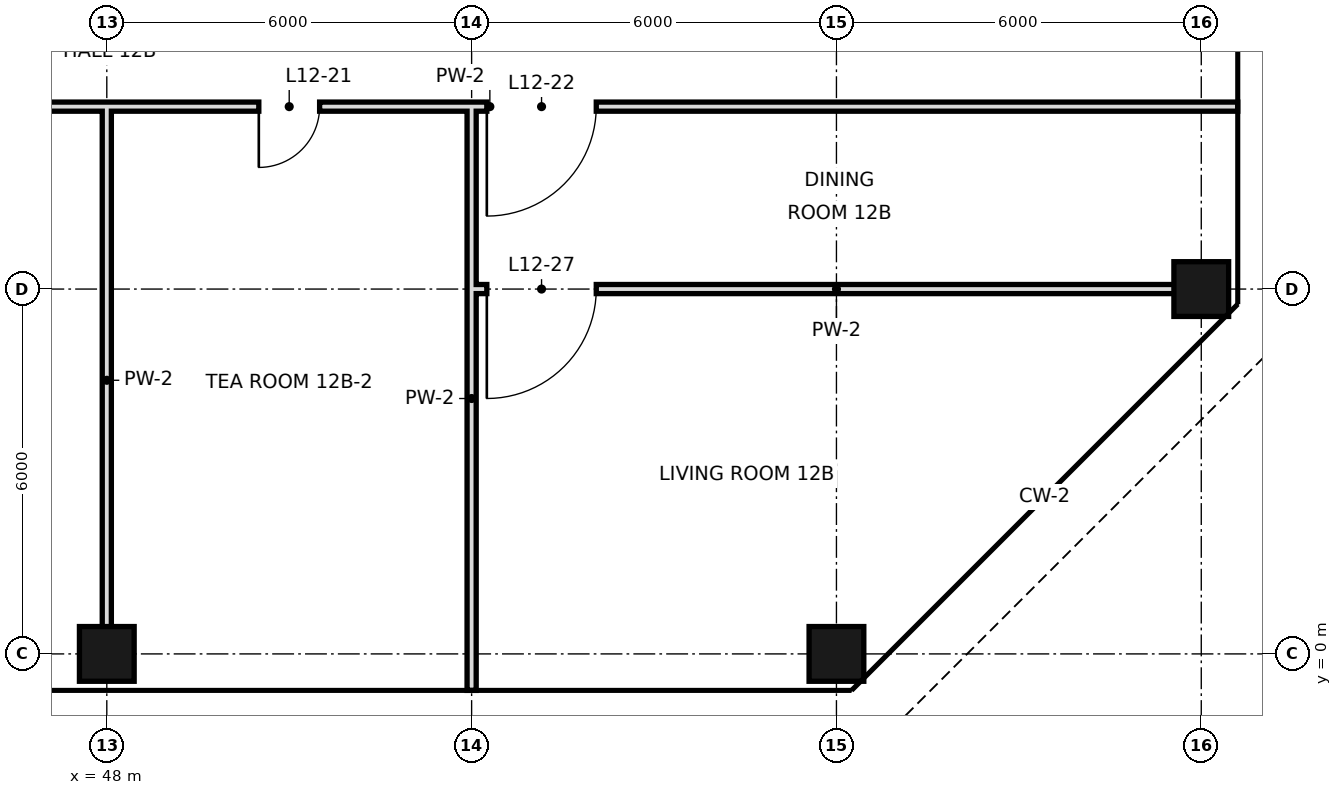
"""IFC4 building model, lengths in metres.
Left out: names, types, materials, properties, quantities, classifications, styles, units other than length and angle.
Written with IfcOpenShell. Run it as: python <this file> out.ifc"""

import sys

from ifc_helpers import new_model, si_unit, direction, frame, frame_2d, origin, origin_2d, place, context, subcontext, project, spatial, rectangle, hollow_rectangle, extrude, element, fill, save


model = new_model("IFC4")
c1 = context("Model", 3, precision=1e-05, world=origin(), true_north=direction((0.0, 1.0)))
c2 = subcontext(c1, "Body", "Model", "MODEL_VIEW")
j1 = project(units=[si_unit("LENGTHUNIT", "METRE"), si_unit("PLANEANGLEUNIT", "RADIAN")], contexts=[c1])
p1 = place(None, origin())
s1 = spatial("IfcSite", under=j1, at=p1, CompositionType="ELEMENT")
p2 = place(p1, origin())
s2 = spatial("IfcBuilding", under=s1, at=p2, CompositionType="ELEMENT")
p3 = place(p2, frame((0.0, 0.0, 64.2)))
s3 = spatial("IfcBuildingStorey", under=s2, at=p3, CompositionType="ELEMENT", Elevation=64.2)
for number, where, z_axis, x_axis in (
    (1, (48.0, 0.0, 0.0), (0.0, 0.0, 1.0), (1.0, 0.0, 0.0)),
    (2, (60.0, 0.0, 0.0), (0.0, 0.0, 1.0), (1.0, 0.0, 0.0)),
    (3, (66.0, 6.0, 0.0), (0.0, 0.0, 1.0), (1.0, 0.0, 0.0)),
):
    element("IfcColumn", number, at=place(p3, frame(where, z_axis=z_axis, x_axis=x_axis)), inside=s3, PredefinedType="COLUMN", context=c2, shape_type="SweptSolid", body=[
        extrude(hollow_rectangle(XDim=0.9, YDim=0.9, WallThickness=0.045, at=origin_2d()), origin(), (0.0, 0.0, 1.0), 3.6),
    ])
p4 = place(p3, frame((48.0, 0.0, 0.0), z_axis=(0.0, 0.0, 1.0), x_axis=(0.0, 1.0, 0.0)))
e4 = element("IfcWall", 4, at=p4, inside=s3, PredefinedType="PARTITIONING", context=c2, shape_type="SweptSolid", body=[
    extrude(rectangle(XDim=9.0, YDim=0.15, at=frame_2d((4.5, 0.0))), origin(), (0.0, 0.0, 1.0), 2.72),
])
p5 = place(p3, frame((54.0, -0.6, 0.0), z_axis=(0.0, 0.0, 1.0), x_axis=(0.0, 1.0, 0.0)))
e5 = element("IfcWall", 5, at=p5, inside=s3, PredefinedType="PARTITIONING", context=c2, shape_type="SweptSolid", body=[
    extrude(rectangle(XDim=9.6, YDim=0.15, at=frame_2d((4.8, 0.0))), origin(), (0.0, 0.0, 1.0), 3.42),
])
p6 = place(p3, frame((54.0, 6.0, 0.0), z_axis=(0.0, 0.0, 1.0), x_axis=(1.0, 0.0, 0.0)))
e6 = element("IfcWall", 6, at=p6, inside=s3, PredefinedType="PARTITIONING", context=c2, shape_type="SweptSolid", body=[
    extrude(rectangle(XDim=12.0, YDim=0.15, at=frame_2d((6.0, 0.0))), origin(), (0.0, 0.0, 1.0), 2.52),
])
p7 = place(p6, frame((0.25, 0.0, 0.0)))
e7 = element("IfcOpeningElement", 7, at=p7, cuts=e6, PredefinedType="OPENING", context=c2, shape_type="SweptSolid", body=[
    extrude(rectangle(XDim=1.8, YDim=2.4, at=frame_2d((0.9, 1.2))), frame((0.0, 0.085, 0.0), z_axis=(0.0, -1.0, 0.0), x_axis=(1.0, 0.0, 0.0)), (0.0, 0.0, 1.0), 0.17),
])
p8 = place(p3, frame((42.0, 9.0, 0.0), z_axis=(0.0, 0.0, 1.0), x_axis=(1.0, 0.0, 0.0)))
e8 = element("IfcWall", 8, at=p8, inside=s3, PredefinedType="PARTITIONING", context=c2, shape_type="SweptSolid", body=[
    extrude(rectangle(XDim=24.6, YDim=0.15, at=frame_2d((12.3, 0.0))), origin(), (0.0, 0.0, 1.0), 3.42),
])
p9 = place(p8, frame((1.6, 0.0, 0.0)))
e9 = element("IfcOpeningElement", 9, at=p9, cuts=e8, PredefinedType="OPENING", context=c2, shape_type="SweptSolid", body=[
    extrude(rectangle(XDim=1.0, YDim=2.4, at=frame_2d((0.5, 1.2))), frame((0.0, 0.085, 0.0), z_axis=(0.0, -1.0, 0.0), x_axis=(1.0, 0.0, 0.0)), (0.0, 0.0, 1.0), 0.17),
])
p10 = place(p8, frame((8.5, 0.0, 0.0)))
e10 = element("IfcOpeningElement", 10, at=p10, cuts=e8, PredefinedType="OPENING", context=c2, shape_type="SweptSolid", body=[
    extrude(rectangle(XDim=1.0, YDim=2.4, at=frame_2d((0.5, 1.2))), frame((0.0, 0.085, 0.0), z_axis=(0.0, -1.0, 0.0), x_axis=(1.0, 0.0, 0.0)), (0.0, 0.0, 1.0), 0.17),
])
p11 = place(p8, frame((12.25, 0.0, 0.0)))
e11 = element("IfcOpeningElement", 11, at=p11, cuts=e8, PredefinedType="OPENING", context=c2, shape_type="SweptSolid", body=[
    extrude(rectangle(XDim=1.8, YDim=2.4, at=frame_2d((0.9, 1.2))), frame((0.0, 0.085, 0.0), z_axis=(0.0, -1.0, 0.0), x_axis=(1.0, 0.0, 0.0)), (0.0, 0.0, 1.0), 0.17),
])
p12 = place(p10, frame((1.0, 0.0, 0.0), z_axis=(0.0, 0.0, 1.0), x_axis=(-1.0, 0.0, 0.0)))
e12 = element("IfcDoor", 12, at=p12, inside=s3, OperationType="SINGLE_SWING_RIGHT", PredefinedType="DOOR", context=c2, shape_type="SweptSolid", body=[
    extrude(rectangle(XDim=1.0, YDim=2.4, at=frame_2d((0.5, 1.2))), frame((0.0, 0.025, 0.0), z_axis=(0.0, -1.0, 0.0), x_axis=(1.0, 0.0, 0.0)), (0.0, 0.0, 1.0), 0.05),
])
fill(e10, e12)
p13 = place(p11, frame((1.8, 0.0, 0.0), z_axis=(0.0, 0.0, 1.0), x_axis=(-1.0, 0.0, 0.0)))
e13 = element("IfcDoor", 13, at=p13, inside=s3, OperationType="SINGLE_SWING_RIGHT", PredefinedType="DOOR", context=c2, shape_type="SweptSolid", body=[
    extrude(rectangle(XDim=1.8, YDim=2.4, at=frame_2d((0.9, 1.2))), frame((0.0, 0.025, 0.0), z_axis=(0.0, -1.0, 0.0), x_axis=(1.0, 0.0, 0.0)), (0.0, 0.0, 1.0), 0.05),
])
fill(e11, e13)
p14 = place(p7, frame((1.8, 0.0, 0.0), z_axis=(0.0, 0.0, 1.0), x_axis=(-1.0, 0.0, 0.0)))
e14 = element("IfcDoor", 14, at=p14, inside=s3, OperationType="SINGLE_SWING_RIGHT", PredefinedType="DOOR", context=c2, shape_type="SweptSolid", body=[
    extrude(rectangle(XDim=1.8, YDim=2.4, at=frame_2d((0.9, 1.2))), frame((0.0, 0.025, 0.0), z_axis=(0.0, -1.0, 0.0), x_axis=(1.0, 0.0, 0.0)), (0.0, 0.0, 1.0), 0.05),
])
fill(e7, e14)
save(model, sys.argv[1])
